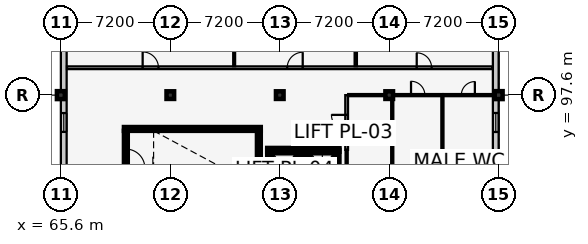
"""IFC4 building model, lengths in metres.
Left out: names, types, materials, properties, quantities, classifications, styles, units other than length and angle.
Written with IfcOpenShell. Run it as: python <this file> out.ifc"""

import sys

from ifc_helpers import new_model, si_unit, direction, frame, frame_2d, origin, origin_2d, place, context, subcontext, project, spatial, rectangle, extrude, element, fill, save


model = new_model("IFC4")
c1 = context("Model", 3, precision=1e-05, world=origin(), true_north=direction((0.0, 1.0)))
c2 = subcontext(c1, "Body", "Model", "MODEL_VIEW")
j1 = project(units=[si_unit("LENGTHUNIT", "METRE"), si_unit("PLANEANGLEUNIT", "RADIAN")], contexts=[c1])
p1 = place(None, origin())
s1 = spatial("IfcSite", under=j1, at=p1, CompositionType="ELEMENT")
p2 = place(p1, origin())
s2 = spatial("IfcBuilding", under=s1, at=p2, CompositionType="ELEMENT")
p3 = place(p2, frame((0.0, 0.0, 21.9)))
s3 = spatial("IfcBuildingStorey", under=s2, at=p3, CompositionType="ELEMENT", Elevation=21.9)
p4 = place(p3, frame((65.6, 97.6, 0.0), z_axis=(0.0, 0.0, 1.0), x_axis=(1.0, 0.0, 0.0)))
e1 = element("IfcColumn", 1, at=p4, inside=s3, PredefinedType="COLUMN", context=c2, shape_type="SweptSolid", body=[
    extrude(rectangle(XDim=0.52, YDim=0.52, at=origin_2d()), origin(), (0.0, 0.0, 1.0), 3.9),
])
for number, where, z_axis, x_axis in (
    (2, (72.8, 97.6, 0.0), (0.0, 0.0, 1.0), (1.0, 0.0, 0.0)),
    (3, (80.0, 97.6, 0.0), (0.0, 0.0, 1.0), (1.0, 0.0, 0.0)),
    (4, (87.2, 97.6, 0.0), (0.0, 0.0, 1.0), (1.0, 0.0, 0.0)),
):
    element("IfcColumn", number, at=place(p3, frame(where, z_axis=z_axis, x_axis=x_axis)), inside=s3, PredefinedType="COLUMN", context=c2, shape_type="SweptSolid", body=[
        extrude(rectangle(XDim=0.5, YDim=0.5, at=origin_2d()), origin(), (0.0, 0.0, 1.0), 3.9),
    ])
p5 = place(p3, frame((94.4, 97.6, 0.0), z_axis=(0.0, 0.0, 1.0), x_axis=(1.0, 0.0, 0.0)))
e5 = element("IfcColumn", 5, at=p5, inside=s3, PredefinedType="COLUMN", context=c2, shape_type="SweptSolid", body=[
    extrude(rectangle(XDim=0.52, YDim=0.52, at=origin_2d()), origin(), (0.0, 0.0, 1.0), 3.9),
])
p6 = place(p3, frame((94.21, 104.8, 0.0), z_axis=(0.0, 0.0, 1.0), x_axis=(0.0, -1.0, 0.0)))
e6 = element("IfcWall", 6, at=p6, inside=s3, PredefinedType="SOLIDWALL", context=c2, shape_type="SweptSolid", body=[
    extrude(rectangle(XDim=14.4, YDim=0.38, at=frame_2d((7.2, 0.0))), origin(), (0.0, 0.0, 1.0), 2.915),
])
p7 = place(p6, frame((1.275, 0.0, 0.9)))
e7 = element("IfcOpeningElement", 7, at=p7, cuts=e6, PredefinedType="OPENING", context=c2, shape_type="SweptSolid", body=[
    extrude(rectangle(XDim=1.05, YDim=1.45, at=frame_2d((0.525, 0.725))), frame((0.0, 0.202, 0.0), z_axis=(0.0, -1.0, 0.0), x_axis=(1.0, 0.0, 0.0)), (0.0, 0.0, 1.0), 0.404),
])
p8 = place(p6, frame((8.375, 0.0, 0.9)))
e8 = element("IfcOpeningElement", 8, at=p8, cuts=e6, PredefinedType="OPENING", context=c2, shape_type="SweptSolid", body=[
    extrude(rectangle(XDim=1.25, YDim=1.45, at=frame_2d((0.625, 0.725))), frame((0.0, 0.202, 0.0), z_axis=(0.0, -1.0, 0.0), x_axis=(1.0, 0.0, 0.0)), (0.0, 0.0, 1.0), 0.404),
])
p9 = place(p6, frame((11.925, 0.0, 0.9)))
e9 = element("IfcOpeningElement", 9, at=p9, cuts=e6, PredefinedType="OPENING", context=c2, shape_type="SweptSolid", body=[
    extrude(rectangle(XDim=1.35, YDim=1.45, at=frame_2d((0.675, 0.725))), frame((0.0, 0.202, 0.0), z_axis=(0.0, -1.0, 0.0), x_axis=(1.0, 0.0, 0.0)), (0.0, 0.0, 1.0), 0.404),
])
p10 = place(p3, frame((65.79, 90.4, 0.0), z_axis=(0.0, 0.0, 1.0), x_axis=(0.0, 1.0, 0.0)))
e10 = element("IfcWall", 10, at=p10, inside=s3, PredefinedType="SOLIDWALL", context=c2, shape_type="SweptSolid", body=[
    extrude(rectangle(XDim=14.4, YDim=0.38, at=frame_2d((7.2, 0.0))), origin(), (0.0, 0.0, 1.0), 2.915),
])
p11 = place(p10, frame((1.24, 0.0, 0.9)))
e11 = element("IfcOpeningElement", 11, at=p11, cuts=e10, PredefinedType="OPENING", context=c2, shape_type="SweptSolid", body=[
    extrude(rectangle(XDim=1.12, YDim=1.75, at=frame_2d((0.56, 0.875))), frame((0.0, 0.202, 0.0), z_axis=(0.0, -1.0, 0.0), x_axis=(1.0, 0.0, 0.0)), (0.0, 0.0, 1.0), 0.404),
])
p12 = place(p10, frame((4.78, 0.0, 0.9)))
e12 = element("IfcOpeningElement", 12, at=p12, cuts=e10, PredefinedType="OPENING", context=c2, shape_type="SweptSolid", body=[
    extrude(rectangle(XDim=1.24, YDim=1.75, at=frame_2d((0.62, 0.875))), frame((0.0, 0.202, 0.0), z_axis=(0.0, -1.0, 0.0), x_axis=(1.0, 0.0, 0.0)), (0.0, 0.0, 1.0), 0.404),
])
p13 = place(p10, frame((11.88, 0.0, 0.9)))
e13 = element("IfcOpeningElement", 13, at=p13, cuts=e10, PredefinedType="OPENING", context=c2, shape_type="SweptSolid", body=[
    extrude(rectangle(XDim=1.44, YDim=1.75, at=frame_2d((0.72, 0.875))), frame((0.0, 0.202, 0.0), z_axis=(0.0, -1.0, 0.0), x_axis=(1.0, 0.0, 0.0)), (0.0, 0.0, 1.0), 0.404),
])
p14 = place(p3, frame((78.75, 95.375, 0.0), z_axis=(0.0, 0.0, 1.0), x_axis=(-1.0, 0.0, 0.0)))
e14 = element("IfcWall", 14, at=p14, inside=s3, PredefinedType="SHEAR", context=c2, shape_type="SweptSolid", body=[
    extrude(rectangle(XDim=9.0, YDim=0.25, at=frame_2d((4.5, 0.0))), origin(), (0.0, 0.0, 1.0), 3.66),
])
p15 = place(p3, frame((69.875, 95.25, 0.0), z_axis=(0.0, 0.0, 1.0), x_axis=(0.0, -1.0, 0.0)))
e15 = element("IfcWall", 15, at=p15, inside=s3, PredefinedType="SHEAR", context=c2, shape_type="SweptSolid", body=[
    extrude(rectangle(XDim=3.65, YDim=0.25, at=frame_2d((1.825, 0.0))), origin(), (0.0, 0.0, 1.0), 3.66),
])
p16 = place(p15, frame((1.2, 0.0, 0.0)))
e16 = element("IfcOpeningElement", 16, at=p16, cuts=e15, PredefinedType="OPENING", context=c2, shape_type="SweptSolid", body=[
    extrude(rectangle(XDim=1.25, YDim=2.15, at=frame_2d((0.625, 1.075))), frame((0.0, 0.137, 0.0), z_axis=(0.0, -1.0, 0.0), x_axis=(1.0, 0.0, 0.0)), (0.0, 0.0, 1.0), 0.274),
])
p17 = place(p3, frame((78.625, 91.6, 0.0), z_axis=(0.0, 0.0, 1.0), x_axis=(0.0, 1.0, 0.0)))
e17 = element("IfcWall", 17, at=p17, inside=s3, PredefinedType="SHEAR", context=c2, shape_type="SweptSolid", body=[
    extrude(rectangle(XDim=3.65, YDim=0.25, at=frame_2d((1.825, 0.0))), origin(), (0.0, 0.0, 1.0), 3.66),
])
p18 = place(p3, frame((81.425, 94.0, 0.0), z_axis=(0.0, 0.0, 1.0), x_axis=(-1.0, 0.0, 0.0)))
e18 = element("IfcWall", 18, at=p18, inside=s3, PredefinedType="SHEAR", context=c2, shape_type="SweptSolid", body=[
    extrude(rectangle(XDim=2.25, YDim=0.25, at=frame_2d((1.125, 0.0))), origin(), (0.0, 0.0, 1.0), 3.66),
])
p19 = place(p18, frame((0.625, 0.0, 0.0)))
e19 = element("IfcOpeningElement", 19, at=p19, cuts=e18, PredefinedType="OPENING", context=c2, shape_type="SweptSolid", body=[
    extrude(rectangle(XDim=1.0, YDim=2.15, at=frame_2d((0.5, 1.075))), frame((0.0, 0.137, 0.0), z_axis=(0.0, -1.0, 0.0), x_axis=(1.0, 0.0, 0.0)), (0.0, 0.0, 1.0), 0.274),
])
for number, where, z_axis, x_axis in (
    (20, (79.3, 94.0, 0.0), (0.0, 0.0, 1.0), (0.0, -1.0, 0.0)),
    (21, (81.3, 91.4, 0.0), (0.0, 0.0, 1.0), (0.0, 1.0, 0.0)),
):
    element("IfcWall", number, at=place(p3, frame(where, z_axis=z_axis, x_axis=x_axis)), inside=s3, PredefinedType="SHEAR", context=c2, shape_type="SweptSolid", body=[
        extrude(rectangle(XDim=2.6, YDim=0.25, at=frame_2d((1.3, 0.0))), origin(), (0.0, 0.0, 1.0), 3.66),
    ])
p20 = place(p3, frame((83.925, 94.0, 0.0), z_axis=(0.0, 0.0, 1.0), x_axis=(-1.0, 0.0, 0.0)))
e22 = element("IfcWall", 22, at=p20, inside=s3, PredefinedType="SHEAR", context=c2, shape_type="SweptSolid", body=[
    extrude(rectangle(XDim=2.25, YDim=0.25, at=frame_2d((1.125, 0.0))), origin(), (0.0, 0.0, 1.0), 3.66),
])
p21 = place(p20, frame((0.625, 0.0, 0.0)))
e23 = element("IfcOpeningElement", 23, at=p21, cuts=e22, PredefinedType="OPENING", context=c2, shape_type="SweptSolid", body=[
    extrude(rectangle(XDim=1.0, YDim=2.15, at=frame_2d((0.5, 1.075))), frame((0.0, 0.137, 0.0), z_axis=(0.0, -1.0, 0.0), x_axis=(1.0, 0.0, 0.0)), (0.0, 0.0, 1.0), 0.274),
])
for number, where, z_axis, x_axis in (
    (24, (81.8, 94.0, 0.0), (0.0, 0.0, 1.0), (0.0, -1.0, 0.0)),
    (25, (83.8, 91.4, 0.0), (0.0, 0.0, 1.0), (0.0, 1.0, 0.0)),
):
    element("IfcWall", number, at=place(p3, frame(where, z_axis=z_axis, x_axis=x_axis)), inside=s3, PredefinedType="SHEAR", context=c2, shape_type="SweptSolid", body=[
        extrude(rectangle(XDim=2.6, YDim=0.25, at=frame_2d((1.3, 0.0))), origin(), (0.0, 0.0, 1.0), 3.66),
    ])
p22 = place(p3, frame((66.0, 99.4, 0.0), z_axis=(0.0, 0.0, 1.0), x_axis=(1.0, 0.0, 0.0)))
e26 = element("IfcWall", 26, at=p22, inside=s3, PredefinedType="PARTITIONING", context=c2, shape_type="SweptSolid", body=[
    extrude(rectangle(XDim=28.0, YDim=0.18, at=frame_2d((14.0, 0.0))), origin(), (0.0, 0.0, 1.0), 3.66),
])
p23 = place(p22, frame((4.98, 0.0, 0.0)))
e27 = element("IfcOpeningElement", 27, at=p23, cuts=e26, PredefinedType="OPENING", context=c2, shape_type="SweptSolid", body=[
    extrude(rectangle(XDim=1.04, YDim=2.15, at=frame_2d((0.52, 1.075))), frame((0.0, 0.102, 0.0), z_axis=(0.0, -1.0, 0.0), x_axis=(1.0, 0.0, 0.0)), (0.0, 0.0, 1.0), 0.204),
])
p24 = place(p22, frame((14.49, 0.0, 0.0)))
e28 = element("IfcOpeningElement", 28, at=p24, cuts=e26, PredefinedType="OPENING", context=c2, shape_type="SweptSolid", body=[
    extrude(rectangle(XDim=1.02, YDim=2.12, at=frame_2d((0.51, 1.06))), frame((0.0, 0.102, 0.0), z_axis=(0.0, -1.0, 0.0), x_axis=(1.0, 0.0, 0.0)), (0.0, 0.0, 1.0), 0.204),
])
p25 = place(p22, frame((23.01, 0.0, 0.0)))
e29 = element("IfcOpeningElement", 29, at=p25, cuts=e26, PredefinedType="OPENING", context=c2, shape_type="SweptSolid", body=[
    extrude(rectangle(XDim=0.98, YDim=2.12, at=frame_2d((0.49, 1.06))), frame((0.0, 0.102, 0.0), z_axis=(0.0, -1.0, 0.0), x_axis=(1.0, 0.0, 0.0)), (0.0, 0.0, 1.0), 0.204),
])
p26 = place(p3, frame((84.4, 94.0, 0.0), z_axis=(0.0, 0.0, 1.0), x_axis=(0.0, 1.0, 0.0)))
e30 = element("IfcWall", 30, at=p26, inside=s3, PredefinedType="PARTITIONING", context=c2, shape_type="SweptSolid", body=[
    extrude(rectangle(XDim=3.6, YDim=0.18, at=frame_2d((1.8, 0.0))), origin(), (0.0, 0.0, 1.0), 3.66),
])
p27 = place(p26, frame((1.3, 0.0, 0.0)))
e31 = element("IfcOpeningElement", 31, at=p27, cuts=e30, PredefinedType="OPENING", context=c2, shape_type="SweptSolid", body=[
    extrude(rectangle(XDim=1.0, YDim=2.1, at=frame_2d((0.5, 1.05))), frame((0.0, 0.102, 0.0), z_axis=(0.0, -1.0, 0.0), x_axis=(1.0, 0.0, 0.0)), (0.0, 0.0, 1.0), 0.204),
])
p28 = place(p3, frame((84.5, 97.6, 0.0), z_axis=(0.0, 0.0, 1.0), x_axis=(1.0, 0.0, 0.0)))
e32 = element("IfcWall", 32, at=p28, inside=s3, PredefinedType="PARTITIONING", context=c2, shape_type="SweptSolid", body=[
    extrude(rectangle(XDim=2.9, YDim=0.14, at=frame_2d((1.45, 0.0))), origin(), (0.0, 0.0, 1.0), 2.985),
])
p29 = place(p3, frame((87.4, 90.8, 0.0), z_axis=(0.0, 0.0, 1.0), x_axis=(0.0, 1.0, 0.0)))
e33 = element("IfcWall", 33, at=p29, inside=s3, PredefinedType="PARTITIONING", context=c2, shape_type="SweptSolid", body=[
    extrude(rectangle(XDim=6.72, YDim=0.14, at=frame_2d((3.36, 0.0))), origin(), (0.0, 0.0, 1.0), 3.035),
])
p30 = place(p3, frame((87.48, 97.6, 0.0), z_axis=(0.0, 0.0, 1.0), x_axis=(1.0, 0.0, 0.0)))
e34 = element("IfcWall", 34, at=p30, inside=s3, PredefinedType="PARTITIONING", context=c2, shape_type="SweptSolid", body=[
    extrude(rectangle(XDim=3.22, YDim=0.14, at=frame_2d((1.61, 0.0))), origin(), (0.0, 0.0, 1.0), 2.935),
])
p31 = place(p30, frame((1.155, 0.0, 0.0)))
e35 = element("IfcOpeningElement", 35, at=p31, cuts=e34, PredefinedType="OPENING", context=c2, shape_type="SweptSolid", body=[
    extrude(rectangle(XDim=0.91, YDim=2.06, at=frame_2d((0.455, 1.03))), frame((0.0, 0.082, 0.0), z_axis=(0.0, -1.0, 0.0), x_axis=(1.0, 0.0, 0.0)), (0.0, 0.0, 1.0), 0.164),
])
p32 = place(p3, frame((90.7, 90.8, 0.0), z_axis=(0.0, 0.0, 1.0), x_axis=(0.0, 1.0, 0.0)))
e36 = element("IfcWall", 36, at=p32, inside=s3, PredefinedType="PARTITIONING", context=c2, shape_type="SweptSolid", body=[
    extrude(rectangle(XDim=6.72, YDim=0.14, at=frame_2d((3.36, 0.0))), origin(), (0.0, 0.0, 1.0), 3.405),
])
p33 = place(p3, frame((90.78, 97.6, 0.0), z_axis=(0.0, 0.0, 1.0), x_axis=(1.0, 0.0, 0.0)))
e37 = element("IfcWall", 37, at=p33, inside=s3, PredefinedType="PARTITIONING", context=c2, shape_type="SweptSolid", body=[
    extrude(rectangle(XDim=3.22, YDim=0.14, at=frame_2d((1.61, 0.0))), origin(), (0.0, 0.0, 1.0), 2.935),
])
p34 = place(p33, frame((1.165, 0.0, 0.0)))
e38 = element("IfcOpeningElement", 38, at=p34, cuts=e37, PredefinedType="OPENING", context=c2, shape_type="SweptSolid", body=[
    extrude(rectangle(XDim=0.89, YDim=2.05, at=frame_2d((0.445, 1.025))), frame((0.0, 0.082, 0.0), z_axis=(0.0, -1.0, 0.0), x_axis=(1.0, 0.0, 0.0)), (0.0, 0.0, 1.0), 0.164),
])
p35 = place(p3, frame((77.0, 99.5, 0.0), z_axis=(0.0, 0.0, 1.0), x_axis=(0.0, 1.0, 0.0)))
e39 = element("IfcWall", 39, at=p35, inside=s3, PredefinedType="PARTITIONING", context=c2, shape_type="SweptSolid", body=[
    extrude(rectangle(XDim=4.9, YDim=0.125, at=frame_2d((2.45, 0.0))), origin(), (0.0, 0.0, 1.0), 3.66),
])
p36 = place(p3, frame((85.0, 99.5, 0.0), z_axis=(0.0, 0.0, 1.0), x_axis=(0.0, 1.0, 0.0)))
e40 = element("IfcWall", 40, at=p36, inside=s3, PredefinedType="PARTITIONING", context=c2, shape_type="SweptSolid", body=[
    extrude(rectangle(XDim=4.9, YDim=0.15, at=frame_2d((2.45, 0.0))), origin(), (0.0, 0.0, 1.0), 3.66),
])
p37 = place(p3, frame((84.4, 90.95, 0.0), z_axis=(0.0, 0.0, 1.0), x_axis=(0.0, 1.0, 0.0)))
e41 = element("IfcWall", 41, at=p37, inside=s3, PredefinedType="PARTITIONING", context=c2, shape_type="SweptSolid", body=[
    extrude(rectangle(XDim=3.0, YDim=0.14, at=frame_2d((1.5, 0.0))), origin(), (0.0, 0.0, 1.0), 3.66),
])
p38 = place(p8, origin())
e42 = element("IfcWindow", 42, at=p38, inside=s3, PartitioningType="SINGLE_PANEL", PredefinedType="WINDOW", context=c2, shape_type="SweptSolid", body=[
    extrude(rectangle(XDim=1.25, YDim=1.45, at=frame_2d((0.625, 0.725))), frame((0.0, 0.03, 0.0), z_axis=(0.0, -1.0, 0.0), x_axis=(1.0, 0.0, 0.0)), (0.0, 0.0, 1.0), 0.06),
])
fill(e8, e42)
p39 = place(p12, origin())
e43 = element("IfcWindow", 43, at=p39, inside=s3, PartitioningType="SINGLE_PANEL", PredefinedType="WINDOW", context=c2, shape_type="SweptSolid", body=[
    extrude(rectangle(XDim=1.24, YDim=1.75, at=frame_2d((0.62, 0.875))), frame((0.0, 0.03, 0.0), z_axis=(0.0, -1.0, 0.0), x_axis=(1.0, 0.0, 0.0)), (0.0, 0.0, 1.0), 0.06),
])
fill(e12, e43)
p40 = place(p16, origin())
e44 = element("IfcDoor", 44, at=p40, inside=s3, OperationType="SINGLE_SWING_RIGHT", PredefinedType="DOOR", context=c2, shape_type="SweptSolid", body=[
    extrude(rectangle(XDim=1.25, YDim=2.15, at=frame_2d((0.625, 1.075))), frame((0.0, 0.025, 0.0), z_axis=(0.0, -1.0, 0.0), x_axis=(1.0, 0.0, 0.0)), (0.0, 0.0, 1.0), 0.05),
])
fill(e16, e44)
p41 = place(p19, origin())
e45 = element("IfcDoor", 45, at=p41, inside=s3, OperationType="SLIDING_TO_LEFT", PredefinedType="DOOR", context=c2, shape_type="SweptSolid", body=[
    extrude(rectangle(XDim=1.0, YDim=2.15, at=frame_2d((0.5, 1.075))), frame((0.0, 0.025, 0.0), z_axis=(0.0, -1.0, 0.0), x_axis=(1.0, 0.0, 0.0)), (0.0, 0.0, 1.0), 0.05),
])
fill(e19, e45)
p42 = place(p21, origin())
e46 = element("IfcDoor", 46, at=p42, inside=s3, OperationType="SLIDING_TO_LEFT", PredefinedType="DOOR", context=c2, shape_type="SweptSolid", body=[
    extrude(rectangle(XDim=1.0, YDim=2.15, at=frame_2d((0.5, 1.075))), frame((0.0, 0.025, 0.0), z_axis=(0.0, -1.0, 0.0), x_axis=(1.0, 0.0, 0.0)), (0.0, 0.0, 1.0), 0.05),
])
fill(e23, e46)
p43 = place(p27, origin())
e47 = element("IfcDoor", 47, at=p43, inside=s3, OperationType="SINGLE_SWING_RIGHT", PredefinedType="DOOR", context=c2, shape_type="SweptSolid", body=[
    extrude(rectangle(XDim=1.0, YDim=2.1, at=frame_2d((0.5, 1.05))), frame((0.0, 0.025, 0.0), z_axis=(0.0, -1.0, 0.0), x_axis=(1.0, 0.0, 0.0)), (0.0, 0.0, 1.0), 0.05),
])
fill(e31, e47)
p44 = place(p31, origin())
e48 = element("IfcDoor", 48, at=p44, inside=s3, OperationType="SINGLE_SWING_LEFT", PredefinedType="DOOR", context=c2, shape_type="SweptSolid", body=[
    extrude(rectangle(XDim=0.91, YDim=2.06, at=frame_2d((0.455, 1.03))), frame((0.0, 0.025, 0.0), z_axis=(0.0, -1.0, 0.0), x_axis=(1.0, 0.0, 0.0)), (0.0, 0.0, 1.0), 0.05),
])
fill(e35, e48)
p45 = place(p34, origin())
e49 = element("IfcDoor", 49, at=p45, inside=s3, OperationType="SINGLE_SWING_RIGHT", PredefinedType="DOOR", context=c2, shape_type="SweptSolid", body=[
    extrude(rectangle(XDim=0.89, YDim=2.05, at=frame_2d((0.445, 1.025))), frame((0.0, 0.025, 0.0), z_axis=(0.0, -1.0, 0.0), x_axis=(1.0, 0.0, 0.0)), (0.0, 0.0, 1.0), 0.05),
])
fill(e38, e49)
p46 = place(p23, origin())
e50 = element("IfcDoor", 50, at=p46, inside=s3, OperationType="SINGLE_SWING_LEFT", PredefinedType="DOOR", context=c2, shape_type="SweptSolid", body=[
    extrude(rectangle(XDim=1.04, YDim=2.15, at=frame_2d((0.52, 1.075))), frame((0.0, 0.025, 0.0), z_axis=(0.0, -1.0, 0.0), x_axis=(1.0, 0.0, 0.0)), (0.0, 0.0, 1.0), 0.05),
])
fill(e27, e50)
p47 = place(p24, origin())
e51 = element("IfcDoor", 51, at=p47, inside=s3, OperationType="SINGLE_SWING_RIGHT", PredefinedType="DOOR", context=c2, shape_type="SweptSolid", body=[
    extrude(rectangle(XDim=1.02, YDim=2.12, at=frame_2d((0.51, 1.06))), frame((0.0, 0.025, 0.0), z_axis=(0.0, -1.0, 0.0), x_axis=(1.0, 0.0, 0.0)), (0.0, 0.0, 1.0), 0.05),
])
fill(e28, e51)
p48 = place(p25, origin())
e52 = element("IfcDoor", 52, at=p48, inside=s3, OperationType="SINGLE_SWING_LEFT", PredefinedType="DOOR", context=c2, shape_type="SweptSolid", body=[
    extrude(rectangle(XDim=0.98, YDim=2.12, at=frame_2d((0.49, 1.06))), frame((0.0, 0.025, 0.0), z_axis=(0.0, -1.0, 0.0), x_axis=(1.0, 0.0, 0.0)), (0.0, 0.0, 1.0), 0.05),
])
fill(e29, e52)
save(model, sys.argv[1])
